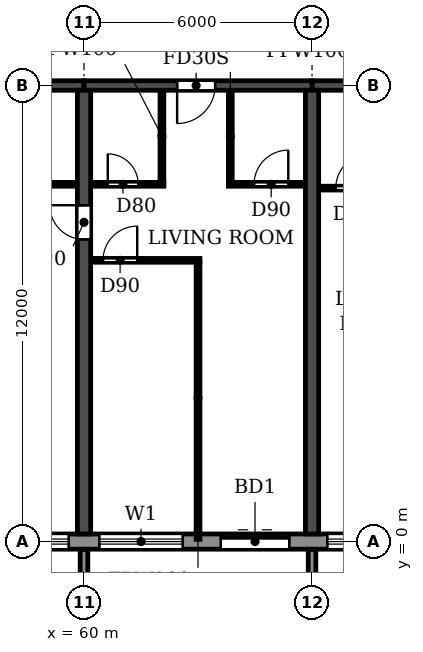
"""IFC4 building model, lengths in metres.
Left out: names, types, materials, properties, quantities, classifications, styles, units other than length and angle.
Written with IfcOpenShell. Run it as: python <this file> out.ifc"""

import sys

from ifc_helpers import new_model, si_unit, direction, frame, frame_2d, origin, place, context, subcontext, project, spatial, polyline, rectangle, outline, extrude, source, transform, mapped, element, fill, save


model = new_model("IFC4")
c1 = context("Model", 3, precision=1e-05, world=origin(), true_north=direction((0.0, 1.0)))
c2 = subcontext(c1, "Body", "Model", "MODEL_VIEW")
j1 = project(units=[si_unit("LENGTHUNIT", "METRE"), si_unit("PLANEANGLEUNIT", "RADIAN")], contexts=[c1])
p1 = place(None, origin())
s1 = spatial("IfcSite", under=j1, at=p1, CompositionType="ELEMENT")
p2 = place(p1, origin())
s2 = spatial("IfcBuilding", under=s1, at=p2, CompositionType="ELEMENT")
p3 = place(p2, frame((0.0, 0.0, 109.2)))
s3 = spatial("IfcBuildingStorey", under=s2, at=p3, CompositionType="ELEMENT", Elevation=109.2)
p4 = place(p3, frame((60.0, 0.2, 0.0), z_axis=(0.0, 0.0, 1.0), x_axis=(0.0, 1.0, 0.0)))
e1 = element("IfcWall", 1, at=p4, inside=s3, PredefinedType="SHEAR", context=c2, shape_type="SweptSolid", body=[
    extrude(rectangle(XDim=11.675, YDim=0.35, at=frame_2d((5.837, 0.0))), origin(), (0.0, 0.0, 1.0), 3.06),
])
p5 = place(p4, frame((7.75, 0.0, 0.0)))
e2 = element("IfcOpeningElement", 2, at=p5, cuts=e1, PredefinedType="OPENING", context=c2, shape_type="SweptSolid", body=[
    extrude(rectangle(XDim=0.9, YDim=2.1, at=frame_2d((0.45, 1.05))), frame((0.0, 0.185, 0.0), z_axis=(0.0, -1.0, 0.0), x_axis=(1.0, 0.0, 0.0)), (0.0, 0.0, 1.0), 0.37),
])
p6 = place(p3, frame((66.0, 0.2, 0.0), z_axis=(0.0, 0.0, 1.0), x_axis=(0.0, 1.0, 0.0)))
e3 = element("IfcWall", 3, at=p6, inside=s3, PredefinedType="SHEAR", context=c2, shape_type="SweptSolid", body=[
    extrude(rectangle(XDim=11.675, YDim=0.35, at=frame_2d((5.837, 0.0))), origin(), (0.0, 0.0, 1.0), 3.06),
])
p7 = place(p3, frame((54.0, 12.0, 0.0), z_axis=(0.0, 0.0, 1.0), x_axis=(1.0, 0.0, 0.0)))
e4 = element("IfcWall", 4, at=p7, inside=s3, PredefinedType="SHEAR", context=c2, shape_type="SweptSolid", body=[
    extrude(rectangle(XDim=6.0, YDim=0.25, at=frame_2d((3.0, 0.0))), origin(), (0.0, 0.0, 1.0), 2.46),
])
p8 = place(p3, frame((60.0, 12.0, 0.0), z_axis=(0.0, 0.0, 1.0), x_axis=(1.0, 0.0, 0.0)))
e5 = element("IfcWall", 5, at=p8, inside=s3, PredefinedType="SHEAR", context=c2, shape_type="SweptSolid", body=[
    extrude(rectangle(XDim=6.0, YDim=0.25, at=frame_2d((3.0, 0.0))), origin(), (0.0, 0.0, 1.0), 2.46),
])
p9 = place(p8, frame((2.45, 0.0, 0.0)))
e6 = element("IfcOpeningElement", 6, at=p9, cuts=e5, PredefinedType="OPENING", context=c2, shape_type="SweptSolid", body=[
    extrude(rectangle(XDim=1.0, YDim=2.1, at=frame_2d((0.5, 1.05))), frame((0.0, 0.135, 0.0), z_axis=(0.0, -1.0, 0.0), x_axis=(1.0, 0.0, 0.0)), (0.0, 0.0, 1.0), 0.27),
])
p10 = place(p3, frame((66.0, 12.0, 0.0), z_axis=(0.0, 0.0, 1.0), x_axis=(1.0, 0.0, 0.0)))
e7 = element("IfcWall", 7, at=p10, inside=s3, PredefinedType="SHEAR", context=c2, shape_type="SweptSolid", body=[
    extrude(rectangle(XDim=6.0, YDim=0.25, at=frame_2d((3.0, 0.0))), origin(), (0.0, 0.0, 1.0), 2.46),
])
p11 = place(p10, frame((2.55, 0.0, 0.0)))
e8 = element("IfcOpeningElement", 8, at=p11, cuts=e7, PredefinedType="OPENING", context=c2, shape_type="SweptSolid", body=[
    extrude(rectangle(XDim=1.0, YDim=2.1, at=frame_2d((0.5, 1.05))), frame((0.0, 0.135, 0.0), z_axis=(0.0, -1.0, 0.0), x_axis=(1.0, 0.0, 0.0)), (0.0, 0.0, 1.0), 0.27),
])
p12 = place(p3, frame((16.683, 0.0, 0.0), z_axis=(0.0, 0.0, 1.0), x_axis=(1.0, 0.0, 0.0)))
e9 = element("IfcWall", 9, at=p12, inside=s3, PredefinedType="STANDARD", context=c2, shape_type="SweptSolid", body=[
    extrude(rectangle(XDim=68.634, YDim=0.4, at=frame_2d((34.317, 0.0))), origin(), (0.0, 0.0, 1.0), 3.06),
])
p13 = place(p12, frame((1.717, 0.0, 0.9)))
e10 = element("IfcOpeningElement", 10, at=p13, cuts=e9, PredefinedType="OPENING", context=c2, shape_type="SweptSolid", body=[
    extrude(rectangle(XDim=2.2, YDim=1.5, at=frame_2d((1.1, 0.75))), frame((0.0, 0.21, 0.0), z_axis=(0.0, -1.0, 0.0), x_axis=(1.0, 0.0, 0.0)), (0.0, 0.0, 1.0), 0.42),
])
p14 = place(p12, frame((4.717, 0.0, 0.9)))
e11 = element("IfcOpeningElement", 11, at=p14, cuts=e9, PredefinedType="OPENING", context=c2, shape_type="SweptSolid", body=[
    extrude(rectangle(XDim=2.2, YDim=1.5, at=frame_2d((1.1, 0.75))), frame((0.0, 0.21, 0.0), z_axis=(0.0, -1.0, 0.0), x_axis=(1.0, 0.0, 0.0)), (0.0, 0.0, 1.0), 0.42),
])
p15 = place(p12, frame((7.717, 0.0, 0.9)))
e12 = element("IfcOpeningElement", 12, at=p15, cuts=e9, PredefinedType="OPENING", context=c2, shape_type="SweptSolid", body=[
    extrude(rectangle(XDim=2.2, YDim=1.5, at=frame_2d((1.1, 0.75))), frame((0.0, 0.21, 0.0), z_axis=(0.0, -1.0, 0.0), x_axis=(1.0, 0.0, 0.0)), (0.0, 0.0, 1.0), 0.42),
])
p16 = place(p12, frame((10.917, 0.0, 0.0)))
e13 = element("IfcOpeningElement", 13, at=p16, cuts=e9, PredefinedType="OPENING", context=c2, shape_type="SweptSolid", body=[
    extrude(rectangle(XDim=1.8, YDim=2.4, at=frame_2d((0.9, 1.2))), frame((0.0, 0.21, 0.0), z_axis=(0.0, -1.0, 0.0), x_axis=(1.0, 0.0, 0.0)), (0.0, 0.0, 1.0), 0.42),
])
p17 = place(p12, frame((13.717, 0.0, 0.9)))
e14 = element("IfcOpeningElement", 14, at=p17, cuts=e9, PredefinedType="OPENING", context=c2, shape_type="SweptSolid", body=[
    extrude(rectangle(XDim=2.2, YDim=1.5, at=frame_2d((1.1, 0.75))), frame((0.0, 0.21, 0.0), z_axis=(0.0, -1.0, 0.0), x_axis=(1.0, 0.0, 0.0)), (0.0, 0.0, 1.0), 0.42),
])
p18 = place(p12, frame((16.717, 0.0, 0.9)))
e15 = element("IfcOpeningElement", 15, at=p18, cuts=e9, PredefinedType="OPENING", context=c2, shape_type="SweptSolid", body=[
    extrude(rectangle(XDim=2.2, YDim=1.5, at=frame_2d((1.1, 0.75))), frame((0.0, 0.21, 0.0), z_axis=(0.0, -1.0, 0.0), x_axis=(1.0, 0.0, 0.0)), (0.0, 0.0, 1.0), 0.42),
])
p19 = place(p12, frame((19.717, 0.0, 0.9)))
e16 = element("IfcOpeningElement", 16, at=p19, cuts=e9, PredefinedType="OPENING", context=c2, shape_type="SweptSolid", body=[
    extrude(rectangle(XDim=2.2, YDim=1.5, at=frame_2d((1.1, 0.75))), frame((0.0, 0.21, 0.0), z_axis=(0.0, -1.0, 0.0), x_axis=(1.0, 0.0, 0.0)), (0.0, 0.0, 1.0), 0.42),
])
p20 = place(p12, frame((22.717, 0.0, 0.9)))
e17 = element("IfcOpeningElement", 17, at=p20, cuts=e9, PredefinedType="OPENING", context=c2, shape_type="SweptSolid", body=[
    extrude(rectangle(XDim=2.2, YDim=1.5, at=frame_2d((1.1, 0.75))), frame((0.0, 0.21, 0.0), z_axis=(0.0, -1.0, 0.0), x_axis=(1.0, 0.0, 0.0)), (0.0, 0.0, 1.0), 0.42),
])
p21 = place(p12, frame((25.717, 0.0, 0.9)))
e18 = element("IfcOpeningElement", 18, at=p21, cuts=e9, PredefinedType="OPENING", context=c2, shape_type="SweptSolid", body=[
    extrude(rectangle(XDim=2.2, YDim=1.5, at=frame_2d((1.1, 0.75))), frame((0.0, 0.21, 0.0), z_axis=(0.0, -1.0, 0.0), x_axis=(1.0, 0.0, 0.0)), (0.0, 0.0, 1.0), 0.42),
])
p22 = place(p12, frame((28.717, 0.0, 0.9)))
e19 = element("IfcOpeningElement", 19, at=p22, cuts=e9, PredefinedType="OPENING", context=c2, shape_type="SweptSolid", body=[
    extrude(rectangle(XDim=2.2, YDim=1.5, at=frame_2d((1.1, 0.75))), frame((0.0, 0.21, 0.0), z_axis=(0.0, -1.0, 0.0), x_axis=(1.0, 0.0, 0.0)), (0.0, 0.0, 1.0), 0.42),
])
p23 = place(p12, frame((31.917, 0.0, 0.0)))
e20 = element("IfcOpeningElement", 20, at=p23, cuts=e9, PredefinedType="OPENING", context=c2, shape_type="SweptSolid", body=[
    extrude(rectangle(XDim=1.8, YDim=2.4, at=frame_2d((0.9, 1.2))), frame((0.0, 0.21, 0.0), z_axis=(0.0, -1.0, 0.0), x_axis=(1.0, 0.0, 0.0)), (0.0, 0.0, 1.0), 0.42),
])
p24 = place(p12, frame((34.717, 0.0, 0.9)))
e21 = element("IfcOpeningElement", 21, at=p24, cuts=e9, PredefinedType="OPENING", context=c2, shape_type="SweptSolid", body=[
    extrude(rectangle(XDim=2.2, YDim=1.5, at=frame_2d((1.1, 0.75))), frame((0.0, 0.21, 0.0), z_axis=(0.0, -1.0, 0.0), x_axis=(1.0, 0.0, 0.0)), (0.0, 0.0, 1.0), 0.42),
])
p25 = place(p12, frame((37.717, 0.0, 0.9)))
e22 = element("IfcOpeningElement", 22, at=p25, cuts=e9, PredefinedType="OPENING", context=c2, shape_type="SweptSolid", body=[
    extrude(rectangle(XDim=2.2, YDim=1.5, at=frame_2d((1.1, 0.75))), frame((0.0, 0.21, 0.0), z_axis=(0.0, -1.0, 0.0), x_axis=(1.0, 0.0, 0.0)), (0.0, 0.0, 1.0), 0.42),
])
p26 = place(p12, frame((40.717, 0.0, 0.9)))
e23 = element("IfcOpeningElement", 23, at=p26, cuts=e9, PredefinedType="OPENING", context=c2, shape_type="SweptSolid", body=[
    extrude(rectangle(XDim=2.2, YDim=1.5, at=frame_2d((1.1, 0.75))), frame((0.0, 0.21, 0.0), z_axis=(0.0, -1.0, 0.0), x_axis=(1.0, 0.0, 0.0)), (0.0, 0.0, 1.0), 0.42),
])
p27 = place(p12, frame((43.717, 0.0, 0.9)))
e24 = element("IfcOpeningElement", 24, at=p27, cuts=e9, PredefinedType="OPENING", context=c2, shape_type="SweptSolid", body=[
    extrude(rectangle(XDim=2.2, YDim=1.5, at=frame_2d((1.1, 0.75))), frame((0.0, 0.21, 0.0), z_axis=(0.0, -1.0, 0.0), x_axis=(1.0, 0.0, 0.0)), (0.0, 0.0, 1.0), 0.42),
])
p28 = place(p12, frame((46.917, 0.0, 0.0)))
e25 = element("IfcOpeningElement", 25, at=p28, cuts=e9, PredefinedType="OPENING", context=c2, shape_type="SweptSolid", body=[
    extrude(rectangle(XDim=1.8, YDim=2.4, at=frame_2d((0.9, 1.2))), frame((0.0, 0.21, 0.0), z_axis=(0.0, -1.0, 0.0), x_axis=(1.0, 0.0, 0.0)), (0.0, 0.0, 1.0), 0.42),
])
p29 = place(p12, frame((49.717, 0.0, 0.9)))
e26 = element("IfcOpeningElement", 26, at=p29, cuts=e9, PredefinedType="OPENING", context=c2, shape_type="SweptSolid", body=[
    extrude(rectangle(XDim=2.2, YDim=1.5, at=frame_2d((1.1, 0.75))), frame((0.0, 0.21, 0.0), z_axis=(0.0, -1.0, 0.0), x_axis=(1.0, 0.0, 0.0)), (0.0, 0.0, 1.0), 0.42),
])
p30 = place(p12, frame((52.717, 0.0, 0.9)))
e27 = element("IfcOpeningElement", 27, at=p30, cuts=e9, PredefinedType="OPENING", context=c2, shape_type="SweptSolid", body=[
    extrude(rectangle(XDim=2.2, YDim=1.5, at=frame_2d((1.1, 0.75))), frame((0.0, 0.21, 0.0), z_axis=(0.0, -1.0, 0.0), x_axis=(1.0, 0.0, 0.0)), (0.0, 0.0, 1.0), 0.42),
])
p31 = place(p12, frame((55.717, 0.0, 0.9)))
e28 = element("IfcOpeningElement", 28, at=p31, cuts=e9, PredefinedType="OPENING", context=c2, shape_type="SweptSolid", body=[
    extrude(rectangle(XDim=2.2, YDim=1.5, at=frame_2d((1.1, 0.75))), frame((0.0, 0.21, 0.0), z_axis=(0.0, -1.0, 0.0), x_axis=(1.0, 0.0, 0.0)), (0.0, 0.0, 1.0), 0.42),
])
p32 = place(p12, frame((58.717, 0.0, 0.9)))
e29 = element("IfcOpeningElement", 29, at=p32, cuts=e9, PredefinedType="OPENING", context=c2, shape_type="SweptSolid", body=[
    extrude(rectangle(XDim=2.2, YDim=1.5, at=frame_2d((1.1, 0.75))), frame((0.0, 0.21, 0.0), z_axis=(0.0, -1.0, 0.0), x_axis=(1.0, 0.0, 0.0)), (0.0, 0.0, 1.0), 0.42),
])
p33 = place(p12, frame((61.717, 0.0, 0.9)))
e30 = element("IfcOpeningElement", 30, at=p33, cuts=e9, PredefinedType="OPENING", context=c2, shape_type="SweptSolid", body=[
    extrude(rectangle(XDim=2.2, YDim=1.5, at=frame_2d((1.1, 0.75))), frame((0.0, 0.21, 0.0), z_axis=(0.0, -1.0, 0.0), x_axis=(1.0, 0.0, 0.0)), (0.0, 0.0, 1.0), 0.42),
])
p34 = place(p12, frame((64.717, 0.0, 0.9)))
e31 = element("IfcOpeningElement", 31, at=p34, cuts=e9, PredefinedType="OPENING", context=c2, shape_type="SweptSolid", body=[
    extrude(rectangle(XDim=2.2, YDim=1.5, at=frame_2d((1.1, 0.75))), frame((0.0, 0.21, 0.0), z_axis=(0.0, -1.0, 0.0), x_axis=(1.0, 0.0, 0.0)), (0.0, 0.0, 1.0), 0.42),
])
m1 = source(origin(), c2, "Body", "SweptSolid", [
    extrude(outline(polyline([(0.0, 0.0), (0.2, 0.0), (0.2, 1.65), (0.0, 1.65), (0.0, 0.0)])), origin(), (0.0, 0.0, 1.0), 3.1),
])
for number, where in (
    (32, (59.9, -1.85, 0.0)),
    (33, (65.9, -1.85, 0.0)),
):
    element("IfcWall", number, at=place(p3, frame(where)), inside=s3, PredefinedType="STANDARD", context=c2, shape_type="MappedRepresentation", body=[
        mapped(m1, transform((0.0, 0.0, 0.0))),
    ])
p35 = place(p3, frame((60.185, 7.4, 0.0), z_axis=(0.0, 0.0, 1.0), x_axis=(1.0, 0.0, 0.0)))
e34 = element("IfcWall", 34, at=p35, inside=s3, PredefinedType="PARTITIONING", context=c2, shape_type="SweptSolid", body=[
    extrude(rectangle(XDim=2.865, YDim=0.1, at=frame_2d((1.433, 0.0))), origin(), (0.0, 0.0, 1.0), 3.06),
])
p36 = place(p35, frame((0.315, 0.0, 0.0)))
e35 = element("IfcOpeningElement", 35, at=p36, cuts=e34, PredefinedType="OPENING", context=c2, shape_type="SweptSolid", body=[
    extrude(rectangle(XDim=0.9, YDim=2.1, at=frame_2d((0.45, 1.05))), frame((0.0, 0.06, 0.0), z_axis=(0.0, -1.0, 0.0), x_axis=(1.0, 0.0, 0.0)), (0.0, 0.0, 1.0), 0.12),
])
p37 = place(p3, frame((66.185, 9.3, 0.0), z_axis=(0.0, 0.0, 1.0), x_axis=(1.0, 0.0, 0.0)))
e36 = element("IfcWall", 36, at=p37, inside=s3, PredefinedType="PARTITIONING", context=c2, shape_type="SweptSolid", body=[
    extrude(rectangle(XDim=2.015, YDim=0.1, at=frame_2d((1.007, 0.0))), origin(), (0.0, 0.0, 1.0), 3.06),
])
p38 = place(p37, frame((0.44, 0.0, 0.0)))
e37 = element("IfcOpeningElement", 37, at=p38, cuts=e36, PredefinedType="OPENING", context=c2, shape_type="SweptSolid", body=[
    extrude(rectangle(XDim=0.9, YDim=2.1, at=frame_2d((0.45, 1.05))), frame((0.0, 0.06, 0.0), z_axis=(0.0, -1.0, 0.0), x_axis=(1.0, 0.0, 0.0)), (0.0, 0.0, 1.0), 0.12),
])
p39 = place(p3, frame((57.1, 9.4, 0.0), z_axis=(0.0, 0.0, 1.0), x_axis=(1.0, 0.0, 0.0)))
e38 = element("IfcWall", 38, at=p39, inside=s3, PredefinedType="PARTITIONING", context=c2, shape_type="SweptSolid", body=[
    extrude(rectangle(XDim=2.715, YDim=0.1, at=frame_2d((1.357, 0.0))), origin(), (0.0, 0.0, 1.0), 3.06),
])
p40 = place(p39, frame((1.0, 0.0, 0.0)))
e39 = element("IfcOpeningElement", 39, at=p40, cuts=e38, PredefinedType="OPENING", context=c2, shape_type="SweptSolid", body=[
    extrude(rectangle(XDim=0.8, YDim=2.1, at=frame_2d((0.4, 1.05))), frame((0.0, 0.06, 0.0), z_axis=(0.0, -1.0, 0.0), x_axis=(1.0, 0.0, 0.0)), (0.0, 0.0, 1.0), 0.12),
])
p41 = place(p3, frame((60.185, 9.4, 0.0), z_axis=(0.0, 0.0, 1.0), x_axis=(1.0, 0.0, 0.0)))
e40 = element("IfcWall", 40, at=p41, inside=s3, PredefinedType="PARTITIONING", context=c2, shape_type="SweptSolid", body=[
    extrude(rectangle(XDim=1.915, YDim=0.1, at=frame_2d((0.958, 0.0))), origin(), (0.0, 0.0, 1.0), 3.06),
])
p42 = place(p41, frame((0.44, 0.0, 0.0)))
e41 = element("IfcOpeningElement", 41, at=p42, cuts=e40, PredefinedType="OPENING", context=c2, shape_type="SweptSolid", body=[
    extrude(rectangle(XDim=0.8, YDim=2.1, at=frame_2d((0.4, 1.05))), frame((0.0, 0.06, 0.0), z_axis=(0.0, -1.0, 0.0), x_axis=(1.0, 0.0, 0.0)), (0.0, 0.0, 1.0), 0.12),
])
p43 = place(p3, frame((63.8, 9.4, 0.0), z_axis=(0.0, 0.0, 1.0), x_axis=(1.0, 0.0, 0.0)))
e42 = element("IfcWall", 42, at=p43, inside=s3, PredefinedType="PARTITIONING", context=c2, shape_type="SweptSolid", body=[
    extrude(rectangle(XDim=2.015, YDim=0.1, at=frame_2d((1.007, 0.0))), origin(), (0.0, 0.0, 1.0), 3.06),
])
p44 = place(p43, frame((0.675, 0.0, 0.0)))
e43 = element("IfcOpeningElement", 43, at=p44, cuts=e42, PredefinedType="OPENING", context=c2, shape_type="SweptSolid", body=[
    extrude(rectangle(XDim=0.9, YDim=2.1, at=frame_2d((0.45, 1.05))), frame((0.0, 0.06, 0.0), z_axis=(0.0, -1.0, 0.0), x_axis=(1.0, 0.0, 0.0)), (0.0, 0.0, 1.0), 0.12),
])
p45 = place(p3, frame((62.05, 9.45, 0.0), z_axis=(0.0, 0.0, 1.0), x_axis=(0.0, 1.0, 0.0)))
e44 = element("IfcWall", 44, at=p45, inside=s3, PredefinedType="PARTITIONING", context=c2, shape_type="SweptSolid", body=[
    extrude(rectangle(XDim=2.415, YDim=0.1, at=frame_2d((1.208, 0.0))), origin(), (0.0, 0.0, 1.0), 3.06),
])
p46 = place(p3, frame((63.0, 0.06, 0.0), z_axis=(0.0, 0.0, 1.0), x_axis=(0.0, 1.0, 0.0)))
e45 = element("IfcWall", 45, at=p46, inside=s3, PredefinedType="PARTITIONING", context=c2, shape_type="SweptSolid", body=[
    extrude(rectangle(XDim=7.29, YDim=0.1, at=frame_2d((3.645, 0.0))), origin(), (0.0, 0.0, 1.0), 3.06),
])
p47 = place(p3, frame((63.85, 9.45, 0.0), z_axis=(0.0, 0.0, 1.0), x_axis=(0.0, 1.0, 0.0)))
e46 = element("IfcWall", 46, at=p47, inside=s3, PredefinedType="PARTITIONING", context=c2, shape_type="SweptSolid", body=[
    extrude(rectangle(XDim=2.415, YDim=0.1, at=frame_2d((1.208, 0.0))), origin(), (0.0, 0.0, 1.0), 3.06),
])
p48 = place(p26, origin())
e47 = element("IfcWindow", 47, at=p48, inside=s3, PartitioningType="DOUBLE_PANEL_HORIZONTAL", PredefinedType="WINDOW", context=c2, shape_type="SweptSolid", body=[
    extrude(rectangle(XDim=2.2, YDim=1.5, at=frame_2d((1.1, 0.75))), frame((0.0, 0.03, 0.0), z_axis=(0.0, -1.0, 0.0), x_axis=(1.0, 0.0, 0.0)), (0.0, 0.0, 1.0), 0.06),
])
fill(e23, e47)
p49 = place(p27, origin())
e48 = element("IfcWindow", 48, at=p49, inside=s3, PartitioningType="DOUBLE_PANEL_HORIZONTAL", PredefinedType="WINDOW", context=c2, shape_type="SweptSolid", body=[
    extrude(rectangle(XDim=2.2, YDim=1.5, at=frame_2d((1.1, 0.75))), frame((0.0, 0.03, 0.0), z_axis=(0.0, -1.0, 0.0), x_axis=(1.0, 0.0, 0.0)), (0.0, 0.0, 1.0), 0.06),
])
fill(e24, e48)
p50 = place(p28, origin())
e49 = element("IfcDoor", 49, at=p50, inside=s3, OperationType="DOUBLE_DOOR_SLIDING", PredefinedType="DOOR", context=c2, shape_type="SweptSolid", body=[
    extrude(rectangle(XDim=1.8, YDim=2.4, at=frame_2d((0.9, 1.2))), frame((0.0, 0.025, 0.0), z_axis=(0.0, -1.0, 0.0), x_axis=(1.0, 0.0, 0.0)), (0.0, 0.0, 1.0), 0.05),
])
fill(e25, e49)
p51 = place(p29, origin())
e50 = element("IfcWindow", 50, at=p51, inside=s3, PartitioningType="DOUBLE_PANEL_HORIZONTAL", PredefinedType="WINDOW", context=c2, shape_type="SweptSolid", body=[
    extrude(rectangle(XDim=2.2, YDim=1.5, at=frame_2d((1.1, 0.75))), frame((0.0, 0.03, 0.0), z_axis=(0.0, -1.0, 0.0), x_axis=(1.0, 0.0, 0.0)), (0.0, 0.0, 1.0), 0.06),
])
fill(e26, e50)
p52 = place(p5, origin())
e51 = element("IfcDoor", 51, at=p52, inside=s3, OperationType="SINGLE_SWING_RIGHT", PredefinedType="DOOR", context=c2, shape_type="SweptSolid", body=[
    extrude(rectangle(XDim=0.9, YDim=2.1, at=frame_2d((0.45, 1.05))), frame((0.0, 0.025, 0.0), z_axis=(0.0, -1.0, 0.0), x_axis=(1.0, 0.0, 0.0)), (0.0, 0.0, 1.0), 0.05),
])
fill(e2, e51)
p53 = place(p36, origin())
e52 = element("IfcDoor", 52, at=p53, inside=s3, OperationType="SINGLE_SWING_RIGHT", PredefinedType="DOOR", context=c2, shape_type="SweptSolid", body=[
    extrude(rectangle(XDim=0.9, YDim=2.1, at=frame_2d((0.45, 1.05))), frame((0.0, 0.025, 0.0), z_axis=(0.0, -1.0, 0.0), x_axis=(1.0, 0.0, 0.0)), (0.0, 0.0, 1.0), 0.05),
])
fill(e35, e52)
p54 = place(p42, origin())
e53 = element("IfcDoor", 53, at=p54, inside=s3, OperationType="SINGLE_SWING_LEFT", PredefinedType="DOOR", context=c2, shape_type="SweptSolid", body=[
    extrude(rectangle(XDim=0.8, YDim=2.1, at=frame_2d((0.4, 1.05))), frame((0.0, 0.025, 0.0), z_axis=(0.0, -1.0, 0.0), x_axis=(1.0, 0.0, 0.0)), (0.0, 0.0, 1.0), 0.05),
])
fill(e41, e53)
p55 = place(p9, frame((1.0, 0.0, 0.0), z_axis=(0.0, 0.0, 1.0), x_axis=(-1.0, 0.0, 0.0)))
e54 = element("IfcDoor", 54, at=p55, inside=s3, OperationType="SINGLE_SWING_RIGHT", PredefinedType="DOOR", context=c2, shape_type="SweptSolid", body=[
    extrude(rectangle(XDim=1.0, YDim=2.1, at=frame_2d((0.5, 1.05))), frame((0.0, 0.025, 0.0), z_axis=(0.0, -1.0, 0.0), x_axis=(1.0, 0.0, 0.0)), (0.0, 0.0, 1.0), 0.05),
])
fill(e6, e54)
p56 = place(p44, origin())
e55 = element("IfcDoor", 55, at=p56, inside=s3, OperationType="SINGLE_SWING_RIGHT", PredefinedType="DOOR", context=c2, shape_type="SweptSolid", body=[
    extrude(rectangle(XDim=0.9, YDim=2.1, at=frame_2d((0.45, 1.05))), frame((0.0, 0.025, 0.0), z_axis=(0.0, -1.0, 0.0), x_axis=(1.0, 0.0, 0.0)), (0.0, 0.0, 1.0), 0.05),
])
fill(e43, e55)
p57 = place(p38, origin())
e56 = element("IfcDoor", 56, at=p57, inside=s3, OperationType="SINGLE_SWING_RIGHT", PredefinedType="DOOR", context=c2, shape_type="SweptSolid", body=[
    extrude(rectangle(XDim=0.9, YDim=2.1, at=frame_2d((0.45, 1.05))), frame((0.0, 0.025, 0.0), z_axis=(0.0, -1.0, 0.0), x_axis=(1.0, 0.0, 0.0)), (0.0, 0.0, 1.0), 0.05),
])
fill(e37, e56)
save(model, sys.argv[1])
